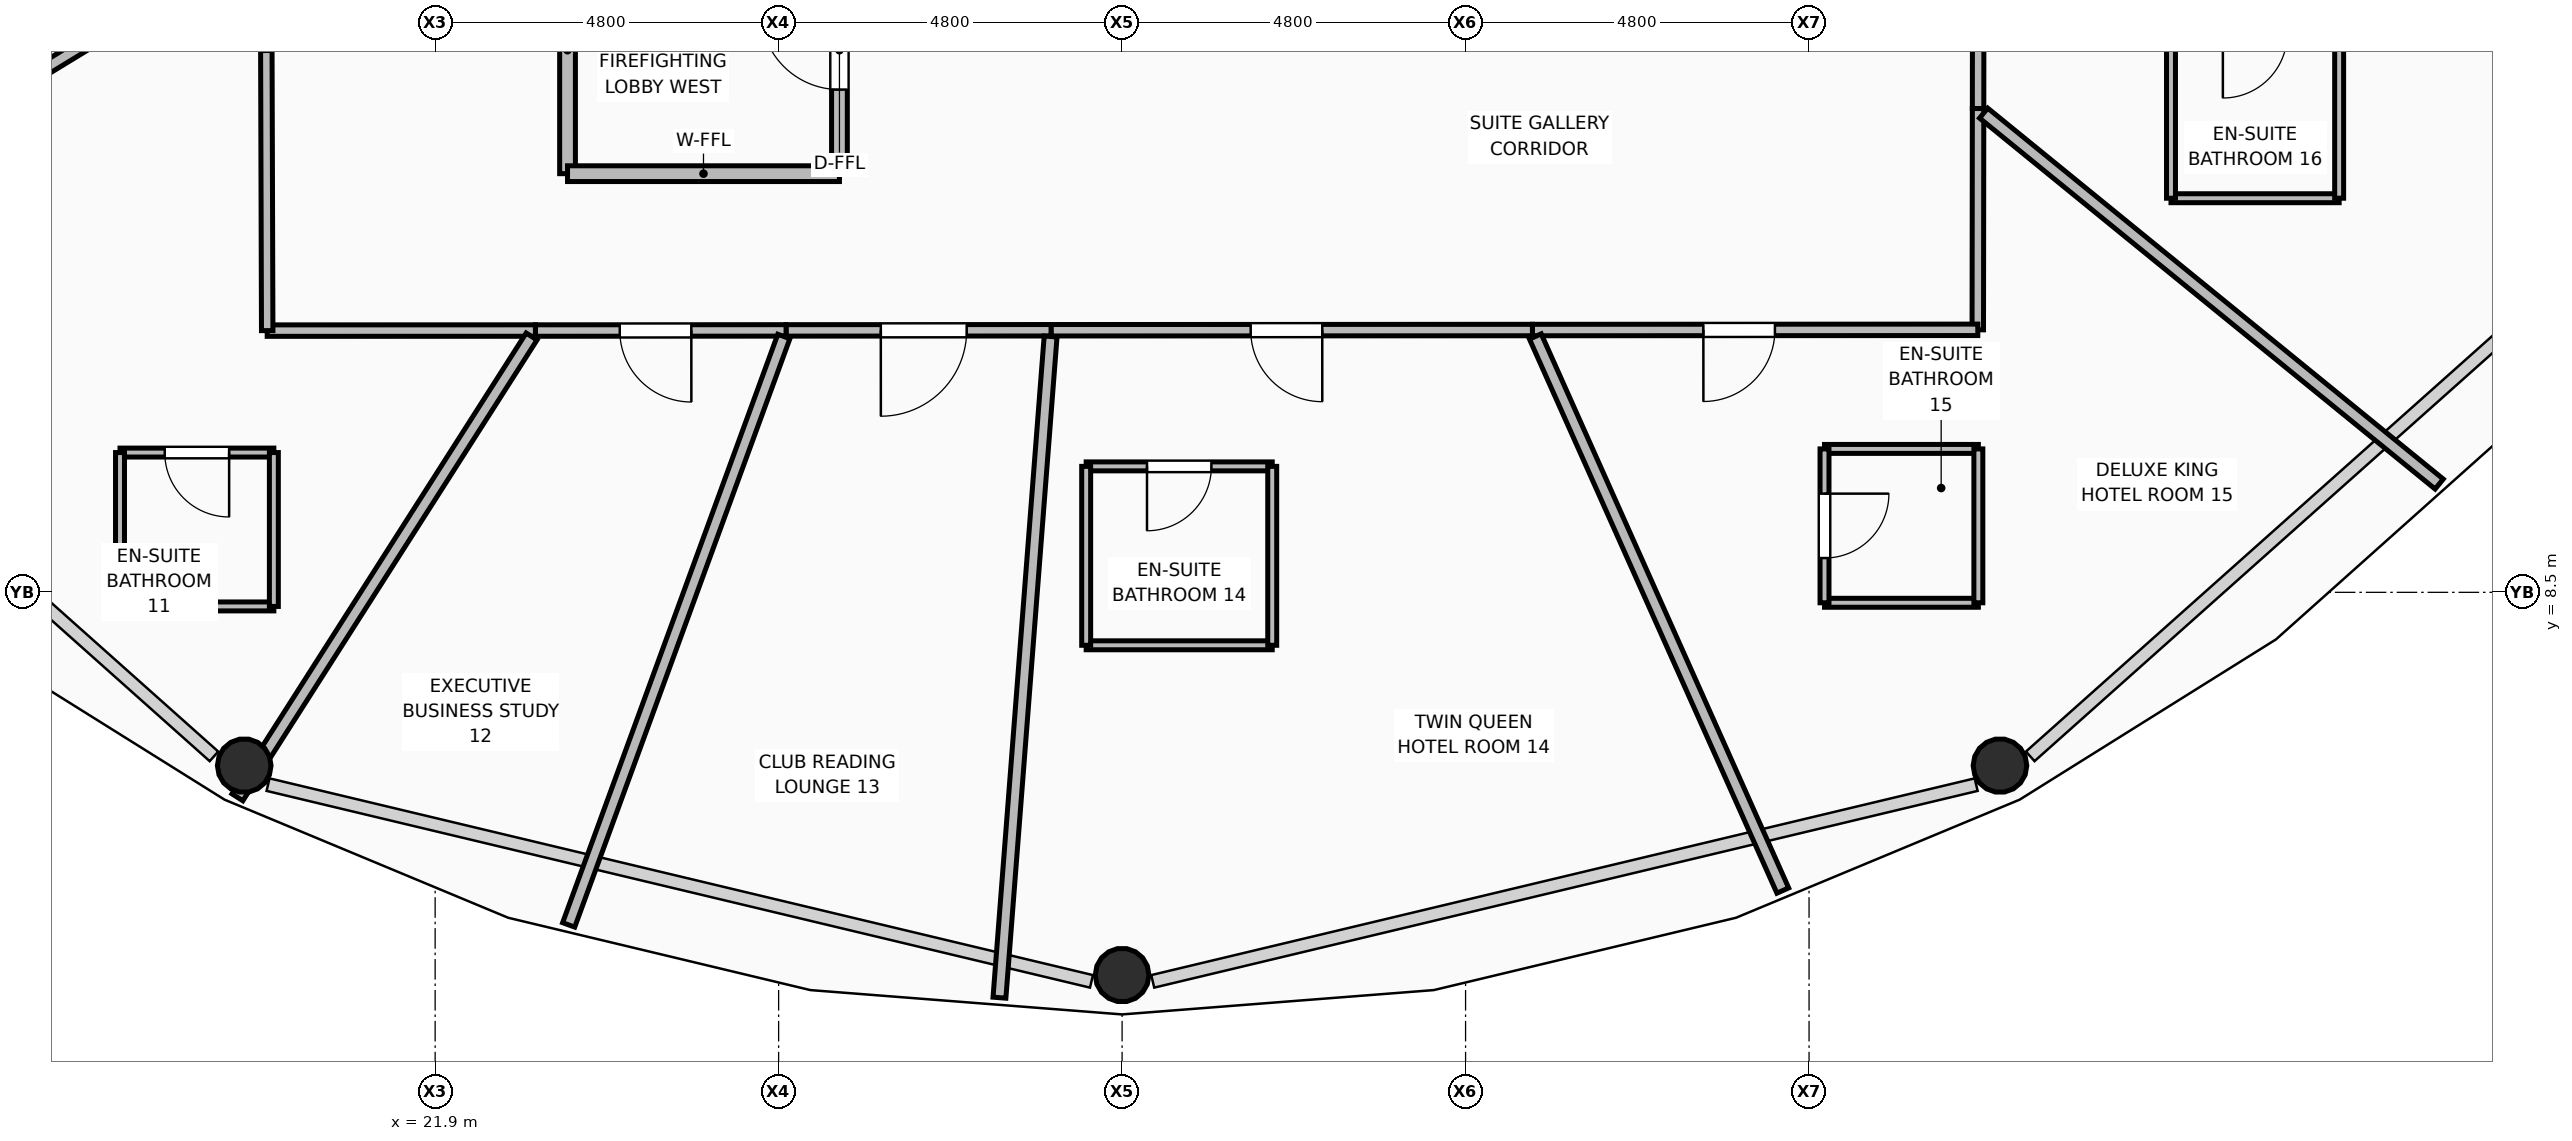
"""IFC4 building model, lengths in metres.
Left out: names, types, materials, properties, quantities, classifications, styles, units other than length and angle.
Written with IfcOpenShell. Run it as: python <this file> out.ifc"""

import sys

from ifc_helpers import new_model, si_unit, direction, frame, frame_2d, origin, origin_2d, place, context, subcontext, project, spatial, rectangle, hollow_circle, extrude, element, fill, save


model = new_model("IFC4")
c1 = context("Model", 3, precision=1e-05, world=origin(), true_north=direction((0.0, 1.0)))
c2 = subcontext(c1, "Body", "Model", "MODEL_VIEW")
j1 = project(units=[si_unit("LENGTHUNIT", "METRE"), si_unit("PLANEANGLEUNIT", "RADIAN")], contexts=[c1])
p1 = place(None, origin())
s1 = spatial("IfcSite", under=j1, at=p1, CompositionType="ELEMENT")
p2 = place(p1, origin())
s2 = spatial("IfcBuilding", under=s1, at=p2, CompositionType="ELEMENT")
p3 = place(p2, frame((0.0, 0.0, 172.2)))
s3 = spatial("IfcBuildingStorey", under=s2, at=p3, CompositionType="ELEMENT", Elevation=172.2)
p4 = place(p3, frame((19.232, 6.079, 0.0), z_axis=(0.0265446917, 0.041036281919, 0.998804987427), x_axis=(-0.839646641546, 0.543133056756, 0.0)))
e1 = element("IfcColumn", 1, at=p4, inside=s3, PredefinedType="COLUMN", context=c2, shape_type="SweptSolid", body=[
    extrude(hollow_circle(Radius=0.375, WallThickness=0.035, at=origin_2d()), origin(), (0.0, 0.0, 1.0), 3.504),
])
p5 = place(p3, frame((31.5, 3.152, 0.0), z_axis=(0.0, 0.047379765961, 0.998876948266), x_axis=(-1.0, 0.0, 0.0)))
e2 = element("IfcColumn", 2, at=p5, inside=s3, PredefinedType="COLUMN", context=c2, shape_type="SweptSolid", body=[
    extrude(hollow_circle(Radius=0.375, WallThickness=0.035, at=origin_2d()), origin(), (0.0, 0.0, 1.0), 3.504),
])
p6 = place(p3, frame((43.768, 6.079, 0.0), z_axis=(-0.0265446917, 0.041036281919, 0.998804987427), x_axis=(-0.839646641546, -0.543133056756, 0.0)))
e3 = element("IfcColumn", 3, at=p6, inside=s3, PredefinedType="COLUMN", context=c2, shape_type="SweptSolid", body=[
    extrude(hollow_circle(Radius=0.375, WallThickness=0.035, at=origin_2d()), origin(), (0.0, 0.0, 1.0), 3.504),
])
p7 = place(p3, frame((23.75, 14.35, 0.0), z_axis=(0.0, 0.0, 1.0), x_axis=(0.0, 1.0, 0.0)))
e4 = element("IfcWall", 4, at=p7, inside=s3, PredefinedType="PARTITIONING", context=c2, shape_type="SweptSolid", body=[
    extrude(rectangle(XDim=3.45, YDim=0.22, at=frame_2d((1.725, 0.0))), origin(), (0.0, 0.0, 1.0), 2.936),
])
p8 = place(p3, frame((23.75, 14.35, 0.0), z_axis=(0.0, 0.0, 1.0), x_axis=(1.0, 0.0, 0.0)))
e5 = element("IfcWall", 5, at=p8, inside=s3, PredefinedType="PARTITIONING", context=c2, shape_type="SweptSolid", body=[
    extrude(rectangle(XDim=3.8, YDim=0.22, at=frame_2d((1.9, 0.0))), origin(), (0.0, 0.0, 1.0), 3.48),
])
p9 = place(p3, frame((27.55, 14.35, 0.0), z_axis=(0.0, 0.0, 1.0), x_axis=(0.0, 1.0, 0.0)))
e6 = element("IfcWall", 6, at=p9, inside=s3, PredefinedType="PARTITIONING", context=c2, shape_type="SweptSolid", body=[
    extrude(rectangle(XDim=3.45, YDim=0.22, at=frame_2d((1.725, 0.0))), origin(), (0.0, 0.0, 1.0), 2.936),
])
p10 = place(p9, frame((1.175, 0.0, 0.0)))
e7 = element("IfcOpeningElement", 7, at=p10, cuts=e6, PredefinedType="OPENING", context=c2, shape_type="SweptSolid", body=[
    extrude(rectangle(XDim=1.1, YDim=2.1, at=frame_2d((0.55, 1.05))), frame((0.0, 0.12, 0.0), z_axis=(0.0, -1.0, 0.0), x_axis=(1.0, 0.0, 0.0)), (0.0, 0.0, 1.0), 0.24),
])
p11 = place(p3, frame((43.465, 17.96, 0.0), z_axis=(0.0, 0.0, 1.0), x_axis=(-0.001175512345, -0.999999309085, 0.0)))
e8 = element("IfcWall", 8, at=p11, inside=s3, PredefinedType="PARTITIONING", context=c2, shape_type="SweptSolid", body=[
    extrude(rectangle(XDim=2.7, YDim=0.16, at=frame_2d((1.35, 0.0))), origin(), (0.0, 0.0, 1.0), 2.936),
])
p12 = place(p3, frame((43.462, 15.26, 0.0), z_axis=(0.0, 0.0, 1.0), x_axis=(-0.001263323113, -0.999999202007, 0.0)))
e9 = element("IfcWall", 9, at=p12, inside=s3, PredefinedType="PARTITIONING", context=c2, shape_type="SweptSolid", body=[
    extrude(rectangle(XDim=3.092, YDim=0.16, at=frame_2d((1.546, 0.0))), origin(), (0.0, 0.0, 1.0), 3.48),
])
p13 = place(p3, frame((43.458, 12.168, 0.0), z_axis=(0.0, 0.0, 1.0), x_axis=(-0.999999889221, -0.000470698936, 0.0)))
e10 = element("IfcWall", 10, at=p13, inside=s3, PredefinedType="PARTITIONING", context=c2, shape_type="SweptSolid", body=[
    extrude(rectangle(XDim=6.224, YDim=0.16, at=frame_2d((3.112, 0.0))), origin(), (0.0, 0.0, 1.0), 2.936),
])
p14 = place(p13, frame((2.835, 0.0, 0.0)))
e11 = element("IfcOpeningElement", 11, at=p14, cuts=e10, PredefinedType="OPENING", context=c2, shape_type="SweptSolid", body=[
    extrude(rectangle(XDim=1.0, YDim=2.1, at=frame_2d((0.5, 1.05))), frame((0.0, 0.09, 0.0), z_axis=(0.0, -1.0, 0.0), x_axis=(1.0, 0.0, 0.0)), (0.0, 0.0, 1.0), 0.18),
])
p15 = place(p3, frame((37.234, 12.165, 0.0), z_axis=(0.0, 0.0, 1.0), x_axis=(-0.999999905159, -0.000435524221, 0.0)))
e12 = element("IfcWall", 12, at=p15, inside=s3, PredefinedType="PARTITIONING", context=c2, shape_type="SweptSolid", body=[
    extrude(rectangle(XDim=6.727, YDim=0.16, at=frame_2d((3.363, 0.0))), origin(), (0.0, 0.0, 1.0), 2.936),
])
p16 = place(p15, frame((2.937, 0.0, 0.0)))
e13 = element("IfcOpeningElement", 13, at=p16, cuts=e12, PredefinedType="OPENING", context=c2, shape_type="SweptSolid", body=[
    extrude(rectangle(XDim=1.0, YDim=2.1, at=frame_2d((0.5, 1.05))), frame((0.0, 0.09, 0.0), z_axis=(0.0, -1.0, 0.0), x_axis=(1.0, 0.0, 0.0)), (0.0, 0.0, 1.0), 0.18),
])
p17 = place(p3, frame((30.507, 12.162, 0.0), z_axis=(0.0, 0.0, 1.0), x_axis=(-0.999999823965, -0.000593354326, 0.0)))
e14 = element("IfcWall", 14, at=p17, inside=s3, PredefinedType="PARTITIONING", context=c2, shape_type="SweptSolid", body=[
    extrude(rectangle(XDim=3.703, YDim=0.16, at=frame_2d((1.852, 0.0))), origin(), (0.0, 0.0, 1.0), 3.48),
])
p18 = place(p17, frame((1.179, 0.0, 0.0)))
e15 = element("IfcOpeningElement", 15, at=p18, cuts=e14, PredefinedType="OPENING", context=c2, shape_type="SweptSolid", body=[
    extrude(rectangle(XDim=1.2, YDim=2.1, at=frame_2d((0.6, 1.05))), frame((0.0, 0.09, 0.0), z_axis=(0.0, -1.0, 0.0), x_axis=(1.0, 0.0, 0.0)), (0.0, 0.0, 1.0), 0.18),
])
p19 = place(p3, frame((26.804, 12.16, 0.0), z_axis=(0.0, 0.0, 1.0), x_axis=(-0.999999844558, -0.000557568912, 0.0)))
e16 = element("IfcWall", 16, at=p19, inside=s3, PredefinedType="PARTITIONING", context=c2, shape_type="SweptSolid", body=[
    extrude(rectangle(XDim=3.503, YDim=0.16, at=frame_2d((1.751, 0.0))), origin(), (0.0, 0.0, 1.0), 3.48),
])
p20 = place(p19, frame((1.324, 0.0, 0.0)))
e17 = element("IfcOpeningElement", 17, at=p20, cuts=e16, PredefinedType="OPENING", context=c2, shape_type="SweptSolid", body=[
    extrude(rectangle(XDim=1.0, YDim=2.1, at=frame_2d((0.5, 1.05))), frame((0.0, 0.09, 0.0), z_axis=(0.0, -1.0, 0.0), x_axis=(1.0, 0.0, 0.0)), (0.0, 0.0, 1.0), 0.18),
])
p21 = place(p3, frame((23.301, 12.158, 0.0), z_axis=(0.0, 0.0, 1.0), x_axis=(-0.999999966056, -0.000260552362, 0.0)))
e18 = element("IfcWall", 18, at=p21, inside=s3, PredefinedType="PARTITIONING", context=c2, shape_type="SweptSolid", body=[
    extrude(rectangle(XDim=3.748, YDim=0.16, at=frame_2d((1.874, 0.0))), origin(), (0.0, 0.0, 1.0), 2.936),
])
p22 = place(p3, frame((19.553, 12.157, 0.0), z_axis=(0.0, 0.0, 1.0), x_axis=(-0.003113283747, 0.99999515372, 0.0)))
e19 = element("IfcWall", 19, at=p22, inside=s3, PredefinedType="PARTITIONING", context=c2, shape_type="SweptSolid", body=[
    extrude(rectangle(XDim=5.803, YDim=0.16, at=frame_2d((2.901, 0.0))), origin(), (0.0, 0.0, 1.0), 2.936),
])
p23 = place(p22, frame((3.896, 0.0, 0.0)))
e20 = element("IfcOpeningElement", 20, at=p23, cuts=e19, PredefinedType="OPENING", context=c2, shape_type="SweptSolid", body=[
    extrude(rectangle(XDim=1.0, YDim=2.1, at=frame_2d((0.5, 1.05))), frame((0.0, 0.09, 0.0), z_axis=(0.0, -1.0, 0.0), x_axis=(1.0, 0.0, 0.0)), (0.0, 0.0, 1.0), 0.18),
])
p24 = place(p3, frame((19.46, 17.656, 0.0), z_axis=(0.0, 0.0, 1.0), x_axis=(-0.853711993856, -0.520745457537, 0.0)))
e21 = element("IfcWall", 21, at=p24, inside=s3, PredefinedType="PARTITIONING", context=c2, shape_type="SweptSolid", body=[
    extrude(rectangle(XDim=9.968, YDim=0.18, at=frame_2d((4.984, 0.0))), origin(), (0.0, 0.0, 1.0), 2.783),
])
p25 = place(p3, frame((23.248, 12.075, 0.0), z_axis=(0.0, 0.0, 1.0), x_axis=(-0.538138353418, -0.84285651957, 0.0)))
e22 = element("IfcWall", 22, at=p25, inside=s3, PredefinedType="PARTITIONING", context=c2, shape_type="SweptSolid", body=[
    extrude(rectangle(XDim=7.639, YDim=0.18, at=frame_2d((3.82, 0.0))), origin(), (0.0, 0.0, 1.0), 2.783),
])
p26 = place(p3, frame((26.773, 12.075, 0.0), z_axis=(0.0, 0.0, 1.0), x_axis=(-0.343462150778, -0.939166519305, 0.0)))
e23 = element("IfcWall", 23, at=p26, inside=s3, PredefinedType="PARTITIONING", context=c2, shape_type="SweptSolid", body=[
    extrude(rectangle(XDim=8.754, YDim=0.18, at=frame_2d((4.377, 0.0))), origin(), (0.0, 0.0, 1.0), 2.783),
])
p27 = place(p3, frame((30.501, 12.075, 0.0), z_axis=(0.0, 0.0, 1.0), x_axis=(-0.077167931776, -0.997018109317, 0.0)))
e24 = element("IfcWall", 24, at=p27, inside=s3, PredefinedType="PARTITIONING", context=c2, shape_type="SweptSolid", body=[
    extrude(rectangle(XDim=9.267, YDim=0.18, at=frame_2d((4.633, 0.0))), origin(), (0.0, 0.0, 1.0), 2.783),
])
p28 = place(p3, frame((37.275, 12.075, 0.0), z_axis=(0.0, 0.0, 1.0), x_axis=(0.407826179391, -0.9130595859, 0.0)))
e25 = element("IfcWall", 25, at=p28, inside=s3, PredefinedType="PARTITIONING", context=c2, shape_type="SweptSolid", body=[
    extrude(rectangle(XDim=8.479, YDim=0.18, at=frame_2d((4.24, 0.0))), origin(), (0.0, 0.0, 1.0), 2.783),
])
p29 = place(p3, frame((43.54, 15.196, 0.0), z_axis=(0.0, 0.0, 1.0), x_axis=(0.775472262913, -0.631381635346, 0.0)))
e26 = element("IfcWall", 26, at=p29, inside=s3, PredefinedType="PARTITIONING", context=c2, shape_type="SweptSolid", body=[
    extrude(rectangle(XDim=8.209, YDim=0.18, at=frame_2d((4.104, 0.0))), origin(), (0.0, 0.0, 1.0), 2.783),
])
p30 = place(p3, frame((17.496, 8.303, 0.0), z_axis=(0.0, 0.0, 1.0), x_axis=(1.0, 0.0, 0.0)))
e27 = element("IfcWall", 27, at=p30, inside=s3, PredefinedType="PARTITIONING", context=c2, shape_type="SweptSolid", body=[
    extrude(rectangle(XDim=2.15, YDim=0.125, at=frame_2d((1.075, 0.0))), origin(), (0.0, 0.0, 1.0), 2.783),
])
p31 = place(p3, frame((17.496, 10.453, 0.0), z_axis=(0.0, 0.0, 1.0), x_axis=(1.0, 0.0, 0.0)))
e28 = element("IfcWall", 28, at=p31, inside=s3, PredefinedType="PARTITIONING", context=c2, shape_type="SweptSolid", body=[
    extrude(rectangle(XDim=2.15, YDim=0.125, at=frame_2d((1.075, 0.0))), origin(), (0.0, 0.0, 1.0), 3.48),
])
p32 = place(p31, frame((0.625, 0.0, 0.0)))
e29 = element("IfcOpeningElement", 29, at=p32, cuts=e28, PredefinedType="OPENING", context=c2, shape_type="SweptSolid", body=[
    extrude(rectangle(XDim=0.9, YDim=2.1, at=frame_2d((0.45, 1.05))), frame((0.0, 0.073, 0.0), z_axis=(0.0, -1.0, 0.0), x_axis=(1.0, 0.0, 0.0)), (0.0, 0.0, 1.0), 0.145),
])
p33 = place(p3, frame((17.496, 8.303, 0.0), z_axis=(0.0, 0.0, 1.0), x_axis=(0.0, 1.0, 0.0)))
e30 = element("IfcWall", 30, at=p33, inside=s3, PredefinedType="PARTITIONING", context=c2, shape_type="SweptSolid", body=[
    extrude(rectangle(XDim=2.15, YDim=0.125, at=frame_2d((1.075, 0.0))), origin(), (0.0, 0.0, 1.0), 2.783),
])
p34 = place(p3, frame((19.646, 8.303, 0.0), z_axis=(0.0, 0.0, 1.0), x_axis=(0.0, 1.0, 0.0)))
e31 = element("IfcWall", 31, at=p34, inside=s3, PredefinedType="PARTITIONING", context=c2, shape_type="SweptSolid", body=[
    extrude(rectangle(XDim=2.15, YDim=0.125, at=frame_2d((1.075, 0.0))), origin(), (0.0, 0.0, 1.0), 2.936),
])
p35 = place(p3, frame((30.998, 7.76, 0.0), z_axis=(0.0, 0.0, 1.0), x_axis=(1.0, 0.0, 0.0)))
e32 = element("IfcWall", 32, at=p35, inside=s3, PredefinedType="PARTITIONING", context=c2, shape_type="SweptSolid", body=[
    extrude(rectangle(XDim=2.6, YDim=0.125, at=frame_2d((1.3, 0.0))), origin(), (0.0, 0.0, 1.0), 2.936),
])
p36 = place(p3, frame((30.998, 10.26, 0.0), z_axis=(0.0, 0.0, 1.0), x_axis=(1.0, 0.0, 0.0)))
e33 = element("IfcWall", 33, at=p36, inside=s3, PredefinedType="PARTITIONING", context=c2, shape_type="SweptSolid", body=[
    extrude(rectangle(XDim=2.6, YDim=0.125, at=frame_2d((1.3, 0.0))), origin(), (0.0, 0.0, 1.0), 2.936),
])
p37 = place(p36, frame((0.85, 0.0, 0.0)))
e34 = element("IfcOpeningElement", 34, at=p37, cuts=e33, PredefinedType="OPENING", context=c2, shape_type="SweptSolid", body=[
    extrude(rectangle(XDim=0.9, YDim=2.1, at=frame_2d((0.45, 1.05))), frame((0.0, 0.073, 0.0), z_axis=(0.0, -1.0, 0.0), x_axis=(1.0, 0.0, 0.0)), (0.0, 0.0, 1.0), 0.145),
])
for number, where, z_axis, x_axis in (
    (35, (30.998, 7.76, 0.0), (0.0, 0.0, 1.0), (0.0, 1.0, 0.0)),
    (36, (33.598, 7.76, 0.0), (0.0, 0.0, 1.0), (0.0, 1.0, 0.0)),
):
    element("IfcWall", number, at=place(p3, frame(where, z_axis=z_axis, x_axis=x_axis)), inside=s3, PredefinedType="PARTITIONING", context=c2, shape_type="SweptSolid", body=[
        extrude(rectangle(XDim=2.5, YDim=0.125, at=frame_2d((1.25, 0.0))), origin(), (0.0, 0.0, 1.0), 3.48),
    ])
for number, where, z_axis, x_axis in (
    (37, (41.316, 8.354, 0.0), (0.0, 0.0, 1.0), (1.0, 0.0, 0.0)),
    (38, (41.316, 10.504, 0.0), (0.0, 0.0, 1.0), (1.0, 0.0, 0.0)),
):
    element("IfcWall", number, at=place(p3, frame(where, z_axis=z_axis, x_axis=x_axis)), inside=s3, PredefinedType="PARTITIONING", context=c2, shape_type="SweptSolid", body=[
        extrude(rectangle(XDim=2.15, YDim=0.125, at=frame_2d((1.075, 0.0))), origin(), (0.0, 0.0, 1.0), 2.936),
    ])
p38 = place(p3, frame((41.316, 8.354, 0.0), z_axis=(0.0, 0.0, 1.0), x_axis=(0.0, 1.0, 0.0)))
e39 = element("IfcWall", 39, at=p38, inside=s3, PredefinedType="PARTITIONING", context=c2, shape_type="SweptSolid", body=[
    extrude(rectangle(XDim=2.15, YDim=0.125, at=frame_2d((1.075, 0.0))), origin(), (0.0, 0.0, 1.0), 3.48),
])
p39 = place(p38, frame((0.625, 0.0, 0.0)))
e40 = element("IfcOpeningElement", 40, at=p39, cuts=e39, PredefinedType="OPENING", context=c2, shape_type="SweptSolid", body=[
    extrude(rectangle(XDim=0.9, YDim=2.1, at=frame_2d((0.45, 1.05))), frame((0.0, 0.073, 0.0), z_axis=(0.0, -1.0, 0.0), x_axis=(1.0, 0.0, 0.0)), (0.0, 0.0, 1.0), 0.145),
])
p40 = place(p3, frame((43.466, 8.354, 0.0), z_axis=(0.0, 0.0, 1.0), x_axis=(0.0, 1.0, 0.0)))
e41 = element("IfcWall", 41, at=p40, inside=s3, PredefinedType="PARTITIONING", context=c2, shape_type="SweptSolid", body=[
    extrude(rectangle(XDim=2.15, YDim=0.125, at=frame_2d((1.075, 0.0))), origin(), (0.0, 0.0, 1.0), 2.936),
])
p41 = place(p3, frame((46.158, 14.007, 0.0), z_axis=(0.0, 0.0, 1.0), x_axis=(1.0, 0.0, 0.0)))
e42 = element("IfcWall", 42, at=p41, inside=s3, PredefinedType="PARTITIONING", context=c2, shape_type="SweptSolid", body=[
    extrude(rectangle(XDim=2.35, YDim=0.125, at=frame_2d((1.175, 0.0))), origin(), (0.0, 0.0, 1.0), 3.48),
])
for number, where, z_axis, x_axis in (
    (43, (46.158, 14.007, 0.0), (0.0, 0.0, 1.0), (0.0, 1.0, 0.0)),
    (44, (48.508, 14.007, 0.0), (0.0, 0.0, 1.0), (0.0, 1.0, 0.0)),
):
    element("IfcWall", number, at=place(p3, frame(where, z_axis=z_axis, x_axis=x_axis)), inside=s3, PredefinedType="PARTITIONING", context=c2, shape_type="SweptSolid", body=[
        extrude(rectangle(XDim=2.3, YDim=0.125, at=frame_2d((1.15, 0.0))), origin(), (0.0, 0.0, 1.0), 2.936),
    ])
p42 = place(p10, origin())
e45 = element("IfcDoor", 45, at=p42, inside=s3, OperationType="SINGLE_SWING_RIGHT", PredefinedType="DOOR", context=c2, shape_type="SweptSolid", body=[
    extrude(rectangle(XDim=1.1, YDim=2.1, at=frame_2d((0.55, 1.05))), frame((0.0, 0.025, 0.0), z_axis=(0.0, -1.0, 0.0), x_axis=(1.0, 0.0, 0.0)), (0.0, 0.0, 1.0), 0.05),
])
fill(e7, e45)
p43 = place(p32, frame((0.9, 0.0, 0.0), z_axis=(0.0, 0.0, 1.0), x_axis=(-1.0, 0.0, 0.0)))
e46 = element("IfcDoor", 46, at=p43, inside=s3, OperationType="SINGLE_SWING_LEFT", PredefinedType="DOOR", context=c2, shape_type="SweptSolid", body=[
    extrude(rectangle(XDim=0.9, YDim=2.1, at=frame_2d((0.45, 1.05))), frame((0.0, 0.025, 0.0), z_axis=(0.0, -1.0, 0.0), x_axis=(1.0, 0.0, 0.0)), (0.0, 0.0, 1.0), 0.05),
])
fill(e29, e46)
p44 = place(p20, origin())
e47 = element("IfcDoor", 47, at=p44, inside=s3, OperationType="SINGLE_SWING_LEFT", PredefinedType="DOOR", context=c2, shape_type="SweptSolid", body=[
    extrude(rectangle(XDim=1.0, YDim=2.1, at=frame_2d((0.5, 1.05))), frame((0.0, 0.025, 0.0), z_axis=(0.0, -1.0, 0.0), x_axis=(1.0, 0.0, 0.0)), (0.0, 0.0, 1.0), 0.05),
])
fill(e17, e47)
p45 = place(p18, origin())
e48 = element("IfcDoor", 48, at=p45, inside=s3, OperationType="SINGLE_SWING_RIGHT", PredefinedType="DOOR", context=c2, shape_type="SweptSolid", body=[
    extrude(rectangle(XDim=1.2, YDim=2.1, at=frame_2d((0.6, 1.05))), frame((0.0, 0.025, 0.0), z_axis=(0.0, -1.0, 0.0), x_axis=(1.0, 0.0, 0.0)), (0.0, 0.0, 1.0), 0.05),
])
fill(e15, e48)
p46 = place(p37, frame((0.9, 0.0, 0.0), z_axis=(0.0, 0.0, 1.0), x_axis=(-1.0, 0.0, 0.0)))
e49 = element("IfcDoor", 49, at=p46, inside=s3, OperationType="SINGLE_SWING_RIGHT", PredefinedType="DOOR", context=c2, shape_type="SweptSolid", body=[
    extrude(rectangle(XDim=0.9, YDim=2.1, at=frame_2d((0.45, 1.05))), frame((0.0, 0.025, 0.0), z_axis=(0.0, -1.0, 0.0), x_axis=(1.0, 0.0, 0.0)), (0.0, 0.0, 1.0), 0.05),
])
fill(e34, e49)
p47 = place(p16, origin())
e50 = element("IfcDoor", 50, at=p47, inside=s3, OperationType="SINGLE_SWING_LEFT", PredefinedType="DOOR", context=c2, shape_type="SweptSolid", body=[
    extrude(rectangle(XDim=1.0, YDim=2.1, at=frame_2d((0.5, 1.05))), frame((0.0, 0.025, 0.0), z_axis=(0.0, -1.0, 0.0), x_axis=(1.0, 0.0, 0.0)), (0.0, 0.0, 1.0), 0.05),
])
fill(e13, e50)
p48 = place(p39, frame((0.9, 0.0, 0.0), z_axis=(0.0, 0.0, 1.0), x_axis=(-1.0, 0.0, 0.0)))
e51 = element("IfcDoor", 51, at=p48, inside=s3, OperationType="SINGLE_SWING_LEFT", PredefinedType="DOOR", context=c2, shape_type="SweptSolid", body=[
    extrude(rectangle(XDim=0.9, YDim=2.1, at=frame_2d((0.45, 1.05))), frame((0.0, 0.025, 0.0), z_axis=(0.0, -1.0, 0.0), x_axis=(1.0, 0.0, 0.0)), (0.0, 0.0, 1.0), 0.05),
])
fill(e40, e51)
p49 = place(p14, origin())
e52 = element("IfcDoor", 52, at=p49, inside=s3, OperationType="SINGLE_SWING_RIGHT", PredefinedType="DOOR", context=c2, shape_type="SweptSolid", body=[
    extrude(rectangle(XDim=1.0, YDim=2.1, at=frame_2d((0.5, 1.05))), frame((0.0, 0.025, 0.0), z_axis=(0.0, -1.0, 0.0), x_axis=(1.0, 0.0, 0.0)), (0.0, 0.0, 1.0), 0.05),
])
fill(e11, e52)
save(model, sys.argv[1])
